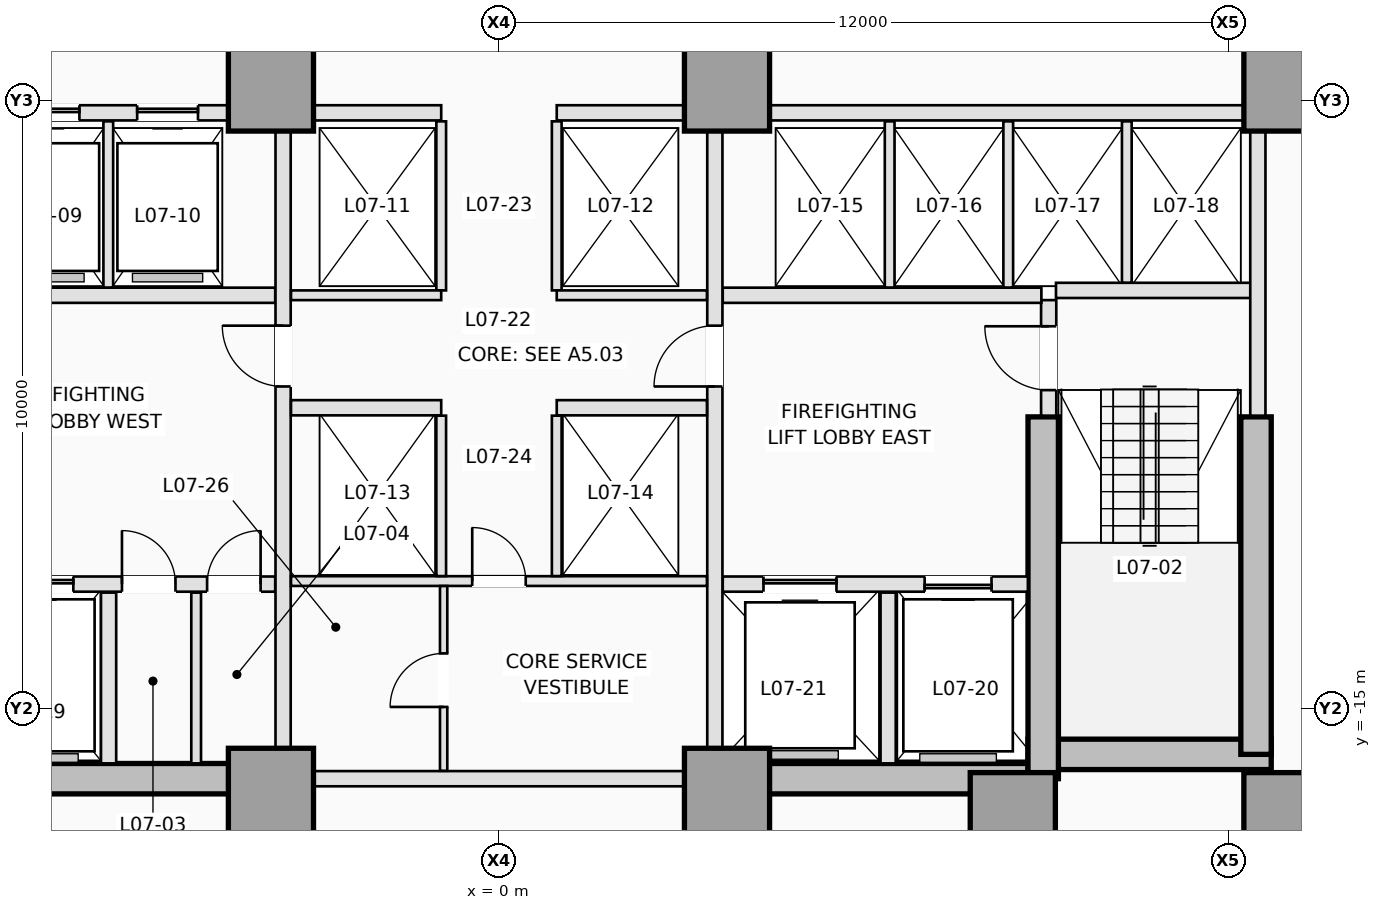
"""IFC4 building model, lengths in metres.
Left out: names, types, materials, properties, quantities, classifications, styles, units other than length and angle.
Written with IfcOpenShell. Run it as: python <this file> out.ifc"""

import sys

from ifc_helpers import new_model, si_unit, direction, frame, frame_2d, origin, origin_2d, place, context, subcontext, project, spatial, rectangle, extrude, element, fill, save


model = new_model("IFC4")
c1 = context("Model", 3, precision=1e-05, world=origin(), true_north=direction((0.0, 1.0)))
c2 = subcontext(c1, "Body", "Model", "MODEL_VIEW")
j1 = project(units=[si_unit("LENGTHUNIT", "METRE"), si_unit("PLANEANGLEUNIT", "RADIAN")], contexts=[c1])
p1 = place(None, origin())
s1 = spatial("IfcSite", under=j1, at=p1, CompositionType="ELEMENT")
p2 = place(p1, origin())
s2 = spatial("IfcBuilding", under=s1, at=p2, CompositionType="ELEMENT")
p3 = place(p2, frame((0.0, 0.0, 31.1)))
s3 = spatial("IfcBuildingStorey", under=s2, at=p3, CompositionType="ELEMENT", Elevation=31.1)
for number, where, z_axis, x_axis in (
    (1, (-8.95, -16.15, 0.0), (0.0, 0.0, 1.0), (1.0, 0.0, 0.0)),
    (2, (3.75, -16.15, 0.0), (0.0, 0.0, 1.0), (1.0, 0.0, 0.0)),
):
    element("IfcWall", number, at=place(p3, frame(where, z_axis=z_axis, x_axis=x_axis)), inside=s3, PredefinedType="SHEAR", context=c2, shape_type="SweptSolid", body=[
        extrude(rectangle(XDim=5.2, YDim=0.5, at=frame_2d((2.6, 0.0))), origin(), (0.0, 0.0, 1.0), 3.5),
    ])
p4 = place(p3, frame((8.7, -15.75, 0.0), z_axis=(0.0, 0.0, 1.0), x_axis=(1.0, 0.0, 0.0)))
e3 = element("IfcWall", 3, at=p4, inside=s3, PredefinedType="SHEAR", context=c2, shape_type="SweptSolid", body=[
    extrude(rectangle(XDim=4.0, YDim=0.5, at=frame_2d((2.0, 0.0))), origin(), (0.0, 0.0, 1.0), 3.5),
])
p5 = place(p3, frame((12.45, -15.75, 0.0), z_axis=(0.0, 0.0, 1.0), x_axis=(0.0, 1.0, 0.0)))
e4 = element("IfcWall", 4, at=p5, inside=s3, PredefinedType="SHEAR", context=c2, shape_type="SweptSolid", body=[
    extrude(rectangle(XDim=5.55, YDim=0.5, at=frame_2d((2.775, 0.0))), origin(), (0.0, 0.0, 1.0), 3.5),
])
p6 = place(p3, frame((8.95, -16.15, 0.0), z_axis=(0.0, 0.0, 1.0), x_axis=(0.0, 1.0, 0.0)))
e5 = element("IfcWall", 5, at=p6, inside=s3, PredefinedType="SHEAR", context=c2, shape_type="SweptSolid", body=[
    extrude(rectangle(XDim=5.95, YDim=0.5, at=frame_2d((2.975, 0.0))), origin(), (0.0, 0.0, 1.0), 3.5),
])
for number, where, z_axis, x_axis in (
    (6, (-3.75, -16.35, 0.0), (0.0, 0.0, 1.0), (1.0, 0.0, 0.0)),
    (7, (3.75, -16.35, 0.0), (0.0, 0.0, 1.0), (1.0, 0.0, 0.0)),
    (8, (8.45, -16.75, 0.0), (0.0, 0.0, 1.0), (1.0, 0.0, 0.0)),
    (9, (12.95, -16.75, 0.0), (0.0, 0.0, 1.0), (1.0, 0.0, 0.0)),
    (10, (-3.75, -4.8, 0.0), (0.0, 0.0, 1.0), (1.0, 0.0, 0.0)),
    (11, (3.75, -4.8, 0.0), (0.0, 0.0, 1.0), (1.0, 0.0, 0.0)),
    (12, (12.95, -4.8, 0.0), (0.0, 0.0, 1.0), (1.0, 0.0, 0.0)),
):
    element("IfcColumn", number, at=place(p3, frame(where, z_axis=z_axis, x_axis=x_axis)), inside=s3, PredefinedType="COLUMN", context=c2, shape_type="SweptSolid", body=[
        extrude(rectangle(XDim=1.4, YDim=1.4, at=origin_2d()), origin(), (0.0, 0.0, 1.0), 3.5),
    ])
p7 = place(p3, frame((9.04, -10.18, 0.0), z_axis=(0.0, 0.0, 1.0), x_axis=(0.0, 1.0, 0.0)))
e13 = element("IfcWall", 13, at=p7, inside=s3, PredefinedType="PARTITIONING", context=c2, shape_type="SweptSolid", body=[
    extrude(rectangle(XDim=1.9, YDim=0.25, at=frame_2d((0.95, 0.0))), origin(), (0.0, 0.0, 1.0), 3.25),
])
p8 = place(p7, frame((0.42, 0.0, 0.0)))
e14 = element("IfcOpeningElement", 14, at=p8, cuts=e13, PredefinedType="OPENING", context=c2, shape_type="SweptSolid", body=[
    extrude(rectangle(XDim=1.05, YDim=2.15, at=frame_2d((0.525, 1.075))), frame((0.0, 0.135, 0.0), z_axis=(0.0, -1.0, 0.0), x_axis=(1.0, 0.0, 0.0)), (0.0, 0.0, 1.0), 0.27),
])
p9 = place(p3, frame((9.16, -8.12, 0.0), z_axis=(0.0, 0.0, 1.0), x_axis=(1.0, 0.0, 0.0)))
e15 = element("IfcWall", 15, at=p9, inside=s3, PredefinedType="PARTITIONING", context=c2, shape_type="SweptSolid", body=[
    extrude(rectangle(XDim=3.22, YDim=0.25, at=frame_2d((1.61, 0.0))), origin(), (0.0, 0.0, 1.0), 3.25),
])
p10 = place(p3, frame((12.48, -10.18, 0.0), z_axis=(0.0, 0.0, 1.0), x_axis=(0.0, 1.0, 0.0)))
e16 = element("IfcWall", 16, at=p10, inside=s3, PredefinedType="PARTITIONING", context=c2, shape_type="SweptSolid", body=[
    extrude(rectangle(XDim=4.678, YDim=0.25, at=frame_2d((2.339, 0.0))), origin(), (0.0, 0.0, 1.0), 3.25),
])
p11 = place(p3, frame((-8.698, -12.95, 0.0), z_axis=(0.0, 0.0, 1.0), x_axis=(1.0, 0.0, 0.0)))
e17 = element("IfcWall", 17, at=p11, inside=s3, PredefinedType="PARTITIONING", context=c2, shape_type="SweptSolid", body=[
    extrude(rectangle(XDim=5.018, YDim=0.25, at=frame_2d((2.509, 0.0))), origin(), (0.0, 0.0, 1.0), 3.25),
])
p12 = place(p11, frame((0.598, 0.0, 0.0)))
e18 = element("IfcOpeningElement", 18, at=p12, cuts=e17, PredefinedType="OPENING", context=c2, shape_type="SweptSolid", body=[
    extrude(rectangle(XDim=1.1, YDim=2.15, at=frame_2d((0.55, 1.075))), frame((0.0, 0.135, 0.0), z_axis=(0.0, -1.0, 0.0), x_axis=(1.0, 0.0, 0.0)), (0.0, 0.0, 1.0), 0.27),
])
p13 = place(p11, frame((2.498, 0.0, 0.0)))
e19 = element("IfcOpeningElement", 19, at=p13, cuts=e17, PredefinedType="OPENING", context=c2, shape_type="SweptSolid", body=[
    extrude(rectangle(XDim=0.88, YDim=2.1, at=frame_2d((0.44, 1.05))), frame((0.0, 0.135, 0.0), z_axis=(0.0, -1.0, 0.0), x_axis=(1.0, 0.0, 0.0)), (0.0, 0.0, 1.0), 0.27),
])
p14 = place(p11, frame((3.898, 0.0, 0.0)))
e20 = element("IfcOpeningElement", 20, at=p14, cuts=e17, PredefinedType="OPENING", context=c2, shape_type="SweptSolid", body=[
    extrude(rectangle(XDim=0.88, YDim=2.1, at=frame_2d((0.44, 1.05))), frame((0.0, 0.135, 0.0), z_axis=(0.0, -1.0, 0.0), x_axis=(1.0, 0.0, 0.0)), (0.0, 0.0, 1.0), 0.27),
])
p15 = place(p3, frame((3.68, -12.95, 0.0), z_axis=(0.0, 0.0, 1.0), x_axis=(1.0, 0.0, 0.0)))
e21 = element("IfcWall", 21, at=p15, inside=s3, PredefinedType="PARTITIONING", context=c2, shape_type="SweptSolid", body=[
    extrude(rectangle(XDim=5.018, YDim=0.25, at=frame_2d((2.509, 0.0))), origin(), (0.0, 0.0, 1.0), 3.25),
])
p16 = place(p15, frame((3.32, 0.0, 0.0)))
e22 = element("IfcOpeningElement", 22, at=p16, cuts=e21, PredefinedType="OPENING", context=c2, shape_type="SweptSolid", body=[
    extrude(rectangle(XDim=1.1, YDim=2.15, at=frame_2d((0.55, 1.075))), frame((0.0, 0.135, 0.0), z_axis=(0.0, -1.0, 0.0), x_axis=(1.0, 0.0, 0.0)), (0.0, 0.0, 1.0), 0.27),
])
p17 = place(p15, frame((0.67, 0.0, 0.0)))
e23 = element("IfcOpeningElement", 23, at=p17, cuts=e21, PredefinedType="OPENING", context=c2, shape_type="SweptSolid", body=[
    extrude(rectangle(XDim=1.2, YDim=2.15, at=frame_2d((0.6, 1.075))), frame((0.0, 0.135, 0.0), z_axis=(0.0, -1.0, 0.0), x_axis=(1.0, 0.0, 0.0)), (0.0, 0.0, 1.0), 0.27),
])
p18 = place(p3, frame((-6.42, -15.898, 0.0), z_axis=(0.0, 0.0, 1.0), x_axis=(0.0, 1.0, 0.0)))
e24 = element("IfcWall", 24, at=p18, inside=s3, PredefinedType="PARTITIONING", context=c2, shape_type="SweptSolid", body=[
    extrude(rectangle(XDim=2.808, YDim=0.25, at=frame_2d((1.404, 0.0))), origin(), (0.0, 0.0, 1.0), 3.25),
])
p19 = place(p3, frame((-4.98, -15.898, 0.0), z_axis=(0.0, 0.0, 1.0), x_axis=(0.0, 1.0, 0.0)))
e25 = element("IfcWall", 25, at=p19, inside=s3, PredefinedType="PARTITIONING", context=c2, shape_type="SweptSolid", body=[
    extrude(rectangle(XDim=2.808, YDim=0.16, at=frame_2d((1.404, 0.0))), origin(), (0.0, 0.0, 1.0), 3.25),
])
p20 = place(p3, frame((6.4, -15.898, 0.0), z_axis=(0.0, 0.0, 1.0), x_axis=(0.0, 1.0, 0.0)))
e26 = element("IfcWall", 26, at=p20, inside=s3, PredefinedType="PARTITIONING", context=c2, shape_type="SweptSolid", body=[
    extrude(rectangle(XDim=2.808, YDim=0.25, at=frame_2d((1.404, 0.0))), origin(), (0.0, 0.0, 1.0), 3.25),
])
for number, where, z_axis, x_axis in (
    (27, (-8.92, -8.2, 0.0), (0.0, 0.0, 1.0), (1.0, 0.0, 0.0)),
    (28, (3.68, -8.2, 0.0), (0.0, 0.0, 1.0), (1.0, 0.0, 0.0)),
):
    element("IfcWall", number, at=place(p3, frame(where, z_axis=z_axis, x_axis=x_axis)), inside=s3, PredefinedType="PARTITIONING", context=c2, shape_type="SweptSolid", body=[
        extrude(rectangle(XDim=5.24, YDim=0.25, at=frame_2d((2.62, 0.0))), origin(), (0.0, 0.0, 1.0), 3.25),
    ])
p21 = place(p3, frame((-3.55, -15.648, 0.0), z_axis=(0.0, 0.0, 1.0), x_axis=(0.0, 1.0, 0.0)))
e29 = element("IfcWall", 29, at=p21, inside=s3, PredefinedType="PARTITIONING", context=c2, shape_type="SweptSolid", body=[
    extrude(rectangle(XDim=10.146, YDim=0.25, at=frame_2d((5.073, 0.0))), origin(), (0.0, 0.0, 1.0), 3.25),
])
p22 = place(p21, frame((5.948, 0.0, 0.0)))
e30 = element("IfcOpeningElement", 30, at=p22, cuts=e29, PredefinedType="OPENING", context=c2, shape_type="SweptSolid", body=[
    extrude(rectangle(XDim=1.0, YDim=2.15, at=frame_2d((0.5, 1.075))), frame((0.0, 0.135, 0.0), z_axis=(0.0, -1.0, 0.0), x_axis=(1.0, 0.0, 0.0)), (0.0, 0.0, 1.0), 0.27),
])
p23 = place(p3, frame((3.55, -15.648, 0.0), z_axis=(0.0, 0.0, 1.0), x_axis=(0.0, 1.0, 0.0)))
e31 = element("IfcWall", 31, at=p23, inside=s3, PredefinedType="PARTITIONING", context=c2, shape_type="SweptSolid", body=[
    extrude(rectangle(XDim=10.146, YDim=0.25, at=frame_2d((5.073, 0.0))), origin(), (0.0, 0.0, 1.0), 3.25),
])
p24 = place(p23, frame((5.948, 0.0, 0.0)))
e32 = element("IfcOpeningElement", 32, at=p24, cuts=e31, PredefinedType="OPENING", context=c2, shape_type="SweptSolid", body=[
    extrude(rectangle(XDim=1.0, YDim=2.15, at=frame_2d((0.5, 1.075))), frame((0.0, 0.135, 0.0), z_axis=(0.0, -1.0, 0.0), x_axis=(1.0, 0.0, 0.0)), (0.0, 0.0, 1.0), 0.27),
])
p25 = place(p3, frame((-12.248, -5.2, 0.0), z_axis=(0.0, 0.0, 1.0), x_axis=(1.0, 0.0, 0.0)))
e33 = element("IfcWall", 33, at=p25, inside=s3, PredefinedType="PARTITIONING", context=c2, shape_type="SweptSolid", body=[
    extrude(rectangle(XDim=7.796, YDim=0.25, at=frame_2d((3.898, 0.0))), origin(), (0.0, 0.0, 1.0), 3.25),
])
p26 = place(p25, frame((0.448, 0.0, 0.0)))
e34 = element("IfcOpeningElement", 34, at=p26, cuts=e33, PredefinedType="OPENING", context=c2, shape_type="SweptSolid", body=[
    extrude(rectangle(XDim=1.0, YDim=2.15, at=frame_2d((0.5, 1.075))), frame((0.0, 0.135, 0.0), z_axis=(0.0, -1.0, 0.0), x_axis=(1.0, 0.0, 0.0)), (0.0, 0.0, 1.0), 0.27),
])
p27 = place(p25, frame((2.398, 0.0, 0.0)))
e35 = element("IfcOpeningElement", 35, at=p27, cuts=e33, PredefinedType="OPENING", context=c2, shape_type="SweptSolid", body=[
    extrude(rectangle(XDim=1.0, YDim=2.15, at=frame_2d((0.5, 1.075))), frame((0.0, 0.135, 0.0), z_axis=(0.0, -1.0, 0.0), x_axis=(1.0, 0.0, 0.0)), (0.0, 0.0, 1.0), 0.27),
])
p28 = place(p25, frame((4.348, 0.0, 0.0)))
e36 = element("IfcOpeningElement", 36, at=p28, cuts=e33, PredefinedType="OPENING", context=c2, shape_type="SweptSolid", body=[
    extrude(rectangle(XDim=1.0, YDim=2.15, at=frame_2d((0.5, 1.075))), frame((0.0, 0.135, 0.0), z_axis=(0.0, -1.0, 0.0), x_axis=(1.0, 0.0, 0.0)), (0.0, 0.0, 1.0), 0.27),
])
p29 = place(p25, frame((6.298, 0.0, 0.0)))
e37 = element("IfcOpeningElement", 37, at=p29, cuts=e33, PredefinedType="OPENING", context=c2, shape_type="SweptSolid", body=[
    extrude(rectangle(XDim=1.0, YDim=2.15, at=frame_2d((0.5, 1.075))), frame((0.0, 0.135, 0.0), z_axis=(0.0, -1.0, 0.0), x_axis=(1.0, 0.0, 0.0)), (0.0, 0.0, 1.0), 0.27),
])
p30 = place(p3, frame((4.452, -5.2, 0.0), z_axis=(0.0, 0.0, 1.0), x_axis=(1.0, 0.0, 0.0)))
e38 = element("IfcWall", 38, at=p30, inside=s3, PredefinedType="PARTITIONING", context=c2, shape_type="SweptSolid", body=[
    extrude(rectangle(XDim=7.796, YDim=0.25, at=frame_2d((3.898, 0.0))), origin(), (0.0, 0.0, 1.0), 3.25),
])
for number, where, z_axis, x_axis in (
    (39, (-3.048, -5.2, 0.0), (0.0, 0.0, 1.0), (1.0, 0.0, 0.0)),
    (40, (0.95, -5.2, 0.0), (0.0, 0.0, 1.0), (1.0, 0.0, 0.0)),
):
    element("IfcWall", number, at=place(p3, frame(where, z_axis=z_axis, x_axis=x_axis)), inside=s3, PredefinedType="PARTITIONING", context=c2, shape_type="SweptSolid", body=[
        extrude(rectangle(XDim=2.098, YDim=0.25, at=frame_2d((1.049, 0.0))), origin(), (0.0, 0.0, 1.0), 3.25),
    ])
for number, where, z_axis, x_axis in (
    (41, (-6.425, -8.073, 0.0), (0.0, 0.0, 1.0), (0.0, 1.0, 0.0)),
    (42, (6.425, -8.073, 0.0), (0.0, 0.0, 1.0), (0.0, 1.0, 0.0)),
    (43, (8.375, -8.073, 0.0), (0.0, 0.0, 1.0), (0.0, 1.0, 0.0)),
):
    element("IfcWall", number, at=place(p3, frame(where, z_axis=z_axis, x_axis=x_axis)), inside=s3, PredefinedType="PARTITIONING", context=c2, shape_type="SweptSolid", body=[
        extrude(rectangle(XDim=2.733, YDim=0.16, at=frame_2d((1.366, 0.0))), origin(), (0.0, 0.0, 1.0), 3.25),
    ])
p31 = place(p3, frame((10.325, -7.993, 0.0), z_axis=(0.0, 0.0, 1.0), x_axis=(0.0, 1.0, 0.0)))
e44 = element("IfcWall", 44, at=p31, inside=s3, PredefinedType="PARTITIONING", context=c2, shape_type="SweptSolid", body=[
    extrude(rectangle(XDim=2.653, YDim=0.16, at=frame_2d((1.326, 0.0))), origin(), (0.0, 0.0, 1.0), 3.25),
])
p32 = place(p3, frame((-3.048, -16.15, 0.0), z_axis=(0.0, 0.0, 1.0), x_axis=(1.0, 0.0, 0.0)))
e45 = element("IfcWall", 45, at=p32, inside=s3, PredefinedType="PARTITIONING", context=c2, shape_type="SweptSolid", body=[
    extrude(rectangle(XDim=6.096, YDim=0.25, at=frame_2d((3.048, 0.0))), origin(), (0.0, 0.0, 1.0), 2.3),
])
for number, where, z_axis, x_axis in (
    (46, (-0.95, -8.12, 0.0), (0.0, 0.0, 1.0), (0.0, 1.0, 0.0)),
    (47, (0.95, -8.12, 0.0), (0.0, 0.0, 1.0), (0.0, 1.0, 0.0)),
):
    element("IfcWall", number, at=place(p3, frame(where, z_axis=z_axis, x_axis=x_axis)), inside=s3, PredefinedType="PARTITIONING", context=c2, shape_type="SweptSolid", body=[
        extrude(rectangle(XDim=2.78, YDim=0.16, at=frame_2d((1.39, 0.0))), origin(), (0.0, 0.0, 1.0), 3.25),
    ])
for number, where, z_axis, x_axis in (
    (48, (-3.42, -8.2, 0.0), (0.0, 0.0, 1.0), (1.0, 0.0, 0.0)),
    (49, (0.95, -8.2, 0.0), (0.0, 0.0, 1.0), (1.0, 0.0, 0.0)),
):
    element("IfcWall", number, at=place(p3, frame(where, z_axis=z_axis, x_axis=x_axis)), inside=s3, PredefinedType="PARTITIONING", context=c2, shape_type="SweptSolid", body=[
        extrude(rectangle(XDim=2.47, YDim=0.16, at=frame_2d((1.235, 0.0))), origin(), (0.0, 0.0, 1.0), 3.25),
    ])
for number, where, z_axis, x_axis in (
    (50, (-3.42, -10.05, 0.0), (0.0, 0.0, 1.0), (1.0, 0.0, 0.0)),
    (51, (0.95, -10.05, 0.0), (0.0, 0.0, 1.0), (1.0, 0.0, 0.0)),
):
    element("IfcWall", number, at=place(p3, frame(where, z_axis=z_axis, x_axis=x_axis)), inside=s3, PredefinedType="PARTITIONING", context=c2, shape_type="SweptSolid", body=[
        extrude(rectangle(XDim=2.47, YDim=0.25, at=frame_2d((1.235, 0.0))), origin(), (0.0, 0.0, 1.0), 3.25),
    ])
p33 = place(p3, frame((-3.42, -12.9, 0.0), z_axis=(0.0, 0.0, 1.0), x_axis=(1.0, 0.0, 0.0)))
e52 = element("IfcWall", 52, at=p33, inside=s3, PredefinedType="PARTITIONING", context=c2, shape_type="SweptSolid", body=[
    extrude(rectangle(XDim=6.84, YDim=0.16, at=frame_2d((3.42, 0.0))), origin(), (0.0, 0.0, 1.0), 3.25),
])
p34 = place(p33, frame((2.98, 0.0, 0.0)))
e53 = element("IfcOpeningElement", 53, at=p34, cuts=e52, PredefinedType="OPENING", context=c2, shape_type="SweptSolid", body=[
    extrude(rectangle(XDim=0.88, YDim=2.12, at=frame_2d((0.44, 1.06))), frame((0.0, 0.09, 0.0), z_axis=(0.0, -1.0, 0.0), x_axis=(1.0, 0.0, 0.0)), (0.0, 0.0, 1.0), 0.18),
])
for number, where, z_axis, x_axis in (
    (54, (-0.95, -12.818, 0.0), (0.0, 0.0, 1.0), (0.0, 1.0, 0.0)),
    (55, (0.95, -12.818, 0.0), (0.0, 0.0, 1.0), (0.0, 1.0, 0.0)),
):
    element("IfcWall", number, at=place(p3, frame(where, z_axis=z_axis, x_axis=x_axis)), inside=s3, PredefinedType="PARTITIONING", context=c2, shape_type="SweptSolid", body=[
        extrude(rectangle(XDim=2.638, YDim=0.16, at=frame_2d((1.319, 0.0))), origin(), (0.0, 0.0, 1.0), 3.25),
    ])
p35 = place(p3, frame((-0.91, -16.02, 0.0), z_axis=(0.0, 0.0, 1.0), x_axis=(0.0, 1.0, 0.0)))
e56 = element("IfcWall", 56, at=p35, inside=s3, PredefinedType="PARTITIONING", context=c2, shape_type="SweptSolid", body=[
    extrude(rectangle(XDim=3.038, YDim=0.12, at=frame_2d((1.519, 0.0))), origin(), (0.0, 0.0, 1.0), 3.25),
])
p36 = place(p35, frame((1.05, 0.0, 0.0)))
e57 = element("IfcOpeningElement", 57, at=p36, cuts=e56, PredefinedType="OPENING", context=c2, shape_type="SweptSolid", body=[
    extrude(rectangle(XDim=0.88, YDim=2.12, at=frame_2d((0.44, 1.06))), frame((0.0, 0.07, 0.0), z_axis=(0.0, -1.0, 0.0), x_axis=(1.0, 0.0, 0.0)), (0.0, 0.0, 1.0), 0.14),
])
p37 = place(p28, origin())
e58 = element("IfcDoor", 58, at=p37, inside=s3, OperationType="SLIDING_TO_LEFT", PredefinedType="DOOR", context=c2, shape_type="SweptSolid", body=[
    extrude(rectangle(XDim=1.0, YDim=2.15, at=frame_2d((0.5, 1.075))), frame((0.0, 0.025, 0.0), z_axis=(0.0, -1.0, 0.0), x_axis=(1.0, 0.0, 0.0)), (0.0, 0.0, 1.0), 0.05),
])
fill(e36, e58)
p38 = place(p29, origin())
e59 = element("IfcDoor", 59, at=p38, inside=s3, OperationType="SLIDING_TO_LEFT", PredefinedType="DOOR", context=c2, shape_type="SweptSolid", body=[
    extrude(rectangle(XDim=1.0, YDim=2.15, at=frame_2d((0.5, 1.075))), frame((0.0, 0.025, 0.0), z_axis=(0.0, -1.0, 0.0), x_axis=(1.0, 0.0, 0.0)), (0.0, 0.0, 1.0), 0.05),
])
fill(e37, e59)
p39 = place(p12, origin())
e60 = element("IfcDoor", 60, at=p39, inside=s3, OperationType="SLIDING_TO_LEFT", PredefinedType="DOOR", context=c2, shape_type="SweptSolid", body=[
    extrude(rectangle(XDim=1.1, YDim=2.15, at=frame_2d((0.55, 1.075))), frame((0.0, 0.025, 0.0), z_axis=(0.0, -1.0, 0.0), x_axis=(1.0, 0.0, 0.0)), (0.0, 0.0, 1.0), 0.05),
])
fill(e18, e60)
p40 = place(p16, origin())
e61 = element("IfcDoor", 61, at=p40, inside=s3, OperationType="SLIDING_TO_RIGHT", PredefinedType="DOOR", context=c2, shape_type="SweptSolid", body=[
    extrude(rectangle(XDim=1.1, YDim=2.15, at=frame_2d((0.55, 1.075))), frame((0.0, 0.025, 0.0), z_axis=(0.0, -1.0, 0.0), x_axis=(1.0, 0.0, 0.0)), (0.0, 0.0, 1.0), 0.05),
])
fill(e22, e61)
p41 = place(p17, origin())
e62 = element("IfcDoor", 62, at=p41, inside=s3, OperationType="SLIDING_TO_LEFT", PredefinedType="DOOR", context=c2, shape_type="SweptSolid", body=[
    extrude(rectangle(XDim=1.2, YDim=2.15, at=frame_2d((0.6, 1.075))), frame((0.0, 0.025, 0.0), z_axis=(0.0, -1.0, 0.0), x_axis=(1.0, 0.0, 0.0)), (0.0, 0.0, 1.0), 0.05),
])
fill(e23, e62)
p42 = place(p8, origin())
e63 = element("IfcDoor", 63, at=p42, inside=s3, OperationType="SINGLE_SWING_RIGHT", PredefinedType="DOOR", context=c2, shape_type="SweptSolid", body=[
    extrude(rectangle(XDim=1.05, YDim=2.15, at=frame_2d((0.525, 1.075))), frame((0.0, 0.025, 0.0), z_axis=(0.0, -1.0, 0.0), x_axis=(1.0, 0.0, 0.0)), (0.0, 0.0, 1.0), 0.05),
])
fill(e14, e63)
p43 = place(p13, origin())
e64 = element("IfcDoor", 64, at=p43, inside=s3, OperationType="SINGLE_SWING_LEFT", PredefinedType="TRAPDOOR", context=c2, shape_type="SweptSolid", body=[
    extrude(rectangle(XDim=0.88, YDim=2.1, at=frame_2d((0.44, 1.05))), frame((0.0, 0.025, 0.0), z_axis=(0.0, -1.0, 0.0), x_axis=(1.0, 0.0, 0.0)), (0.0, 0.0, 1.0), 0.05),
])
fill(e19, e64)
p44 = place(p14, origin())
e65 = element("IfcDoor", 65, at=p44, inside=s3, OperationType="SINGLE_SWING_RIGHT", PredefinedType="TRAPDOOR", context=c2, shape_type="SweptSolid", body=[
    extrude(rectangle(XDim=0.88, YDim=2.1, at=frame_2d((0.44, 1.05))), frame((0.0, 0.025, 0.0), z_axis=(0.0, -1.0, 0.0), x_axis=(1.0, 0.0, 0.0)), (0.0, 0.0, 1.0), 0.05),
])
fill(e20, e65)
p45 = place(p22, origin())
e66 = element("IfcDoor", 66, at=p45, inside=s3, OperationType="SINGLE_SWING_RIGHT", PredefinedType="DOOR", context=c2, shape_type="SweptSolid", body=[
    extrude(rectangle(XDim=1.0, YDim=2.15, at=frame_2d((0.5, 1.075))), frame((0.0, 0.025, 0.0), z_axis=(0.0, -1.0, 0.0), x_axis=(1.0, 0.0, 0.0)), (0.0, 0.0, 1.0), 0.05),
])
fill(e30, e66)
p46 = place(p24, origin())
e67 = element("IfcDoor", 67, at=p46, inside=s3, OperationType="SINGLE_SWING_LEFT", PredefinedType="DOOR", context=c2, shape_type="SweptSolid", body=[
    extrude(rectangle(XDim=1.0, YDim=2.15, at=frame_2d((0.5, 1.075))), frame((0.0, 0.025, 0.0), z_axis=(0.0, -1.0, 0.0), x_axis=(1.0, 0.0, 0.0)), (0.0, 0.0, 1.0), 0.05),
])
fill(e32, e67)
p47 = place(p34, origin())
e68 = element("IfcDoor", 68, at=p47, inside=s3, OperationType="SINGLE_SWING_LEFT", PredefinedType="DOOR", context=c2, shape_type="SweptSolid", body=[
    extrude(rectangle(XDim=0.88, YDim=2.12, at=frame_2d((0.44, 1.06))), frame((0.0, 0.025, 0.0), z_axis=(0.0, -1.0, 0.0), x_axis=(1.0, 0.0, 0.0)), (0.0, 0.0, 1.0), 0.05),
])
fill(e53, e68)
p48 = place(p36, origin())
e69 = element("IfcDoor", 69, at=p48, inside=s3, OperationType="SINGLE_SWING_LEFT", PredefinedType="DOOR", context=c2, shape_type="SweptSolid", body=[
    extrude(rectangle(XDim=0.88, YDim=2.12, at=frame_2d((0.44, 1.06))), frame((0.0, 0.025, 0.0), z_axis=(0.0, -1.0, 0.0), x_axis=(1.0, 0.0, 0.0)), (0.0, 0.0, 1.0), 0.05),
])
fill(e57, e69)
save(model, sys.argv[1])
